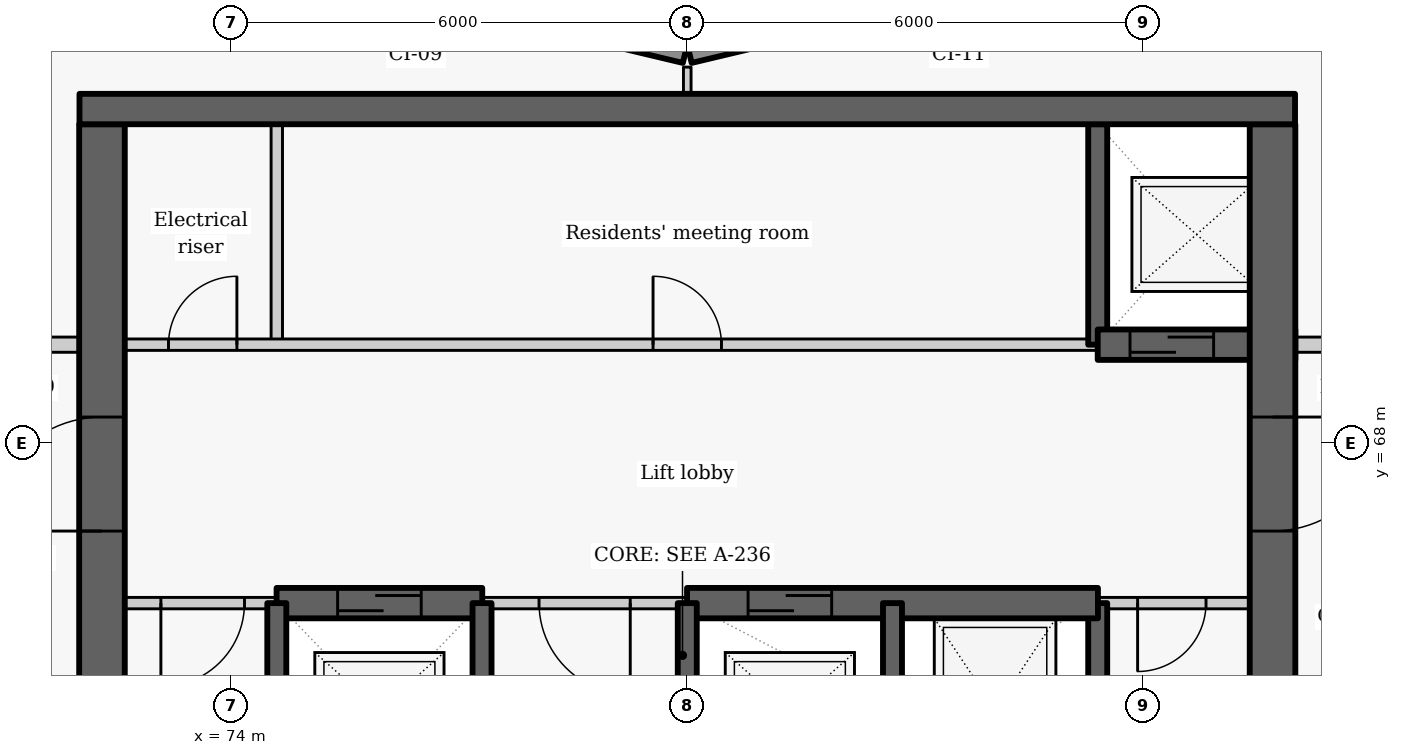
"""IFC4 building model, lengths in metres.
Left out: names, types, materials, properties, quantities, classifications, styles, units other than length and angle.
Written with IfcOpenShell. Run it as: python <this file> out.ifc"""

import sys

from ifc_helpers import new_model, si_unit, direction, frame, frame_2d, origin, place, context, subcontext, project, spatial, rectangle, extrude, element, fill, save


model = new_model("IFC4")
c1 = context("Model", 3, precision=1e-05, world=origin(), true_north=direction((0.0, 1.0)))
c2 = subcontext(c1, "Body", "Model", "MODEL_VIEW")
j1 = project(units=[si_unit("LENGTHUNIT", "METRE"), si_unit("PLANEANGLEUNIT", "RADIAN")], contexts=[c1])
p1 = place(None, origin())
s1 = spatial("IfcSite", under=j1, at=p1, CompositionType="ELEMENT")
p2 = place(p1, origin())
s2 = spatial("IfcBuilding", under=s1, at=p2, CompositionType="ELEMENT")
p3 = place(p2, frame((0.0, 0.0, 213.0)))
s3 = spatial("IfcBuildingStorey", under=s2, at=p3, CompositionType="ELEMENT", Elevation=213.0)
p4 = place(p3, frame((83.186, 73.881, 0.0), z_axis=(0.0, 0.0, 1.0), x_axis=(-0.972773113459, -0.231759508395, 0.0)))
e1 = element("IfcWall", 1, at=p4, inside=s3, PredefinedType="SOLIDWALL", context=c2, shape_type="SweptSolid", body=[
    extrude(rectangle(XDim=3.246, YDim=0.25, at=frame_2d((1.623, 0.0))), origin(), (0.0, 0.0, 1.0), 2.425),
])
p5 = place(p4, frame((0.573, 0.0, 0.9)))
e2 = element("IfcOpeningElement", 2, at=p5, cuts=e1, PredefinedType="OPENING", context=c2, shape_type="SweptSolid", body=[
    extrude(rectangle(XDim=2.1, YDim=1.1, at=frame_2d((1.05, 0.55))), frame((0.0, 0.135, 0.0), z_axis=(0.0, -1.0, 0.0), x_axis=(1.0, 0.0, 0.0)), (0.0, 0.0, 1.0), 0.27),
])
p6 = place(p3, frame((79.971, 73.128, 0.0), z_axis=(0.0, 0.0, 1.0), x_axis=(-0.972773113459, 0.231759508395, 0.0)))
e3 = element("IfcWall", 3, at=p6, inside=s3, PredefinedType="SOLIDWALL", context=c2, shape_type="SweptSolid", body=[
    extrude(rectangle(XDim=3.246, YDim=0.25, at=frame_2d((1.623, 0.0))), origin(), (0.0, 0.0, 1.0), 2.425),
])
p7 = place(p6, frame((0.573, 0.0, 0.9)))
e4 = element("IfcOpeningElement", 4, at=p7, cuts=e3, PredefinedType="OPENING", context=c2, shape_type="SweptSolid", body=[
    extrude(rectangle(XDim=2.1, YDim=1.1, at=frame_2d((1.05, 0.55))), frame((0.0, 0.135, 0.0), z_axis=(0.0, -1.0, 0.0), x_axis=(1.0, 0.0, 0.0)), (0.0, 0.0, 1.0), 0.27),
])
p8 = place(p3, frame((74.6, 69.3, 0.0), z_axis=(0.0, 0.0, 1.0), x_axis=(0.0, 1.0, 0.0)))
e5 = element("IfcWall", 5, at=p8, inside=s3, PredefinedType="PARTITIONING", context=c2, shape_type="SweptSolid", body=[
    extrude(rectangle(XDim=2.9, YDim=0.15, at=frame_2d((1.45, 0.0))), origin(), (0.0, 0.0, 1.0), 3.025),
])
p9 = place(p3, frame((72.0, 69.3, 0.0), z_axis=(0.0, 0.0, 1.0), x_axis=(1.0, 0.0, 0.0)))
e6 = element("IfcWall", 6, at=p9, inside=s3, PredefinedType="PARTITIONING", context=c2, shape_type="SweptSolid", body=[
    extrude(rectangle(XDim=13.4, YDim=0.15, at=frame_2d((6.7, 0.0))), origin(), (0.0, 0.0, 1.0), 3.025),
])
p10 = place(p9, frame((1.175, 0.0, 0.0)))
e7 = element("IfcOpeningElement", 7, at=p10, cuts=e6, PredefinedType="OPENING", context=c2, shape_type="SweptSolid", body=[
    extrude(rectangle(XDim=0.9, YDim=2.1, at=frame_2d((0.45, 1.05))), frame((0.0, 0.085, 0.0), z_axis=(0.0, -1.0, 0.0), x_axis=(1.0, 0.0, 0.0)), (0.0, 0.0, 1.0), 0.17),
])
p11 = place(p9, frame((7.55, 0.0, 0.0)))
e8 = element("IfcOpeningElement", 8, at=p11, cuts=e6, PredefinedType="OPENING", context=c2, shape_type="SweptSolid", body=[
    extrude(rectangle(XDim=0.9, YDim=2.1, at=frame_2d((0.45, 1.05))), frame((0.0, 0.085, 0.0), z_axis=(0.0, -1.0, 0.0), x_axis=(1.0, 0.0, 0.0)), (0.0, 0.0, 1.0), 0.17),
])
p12 = place(p3, frame((72.3, 63.1, -0.275), z_axis=(0.0, 0.0, 1.0), x_axis=(0.0, 1.0, 0.0)))
e9 = element("IfcWall", 9, at=p12, inside=s3, PredefinedType="SHEAR", context=c2, shape_type="SweptSolid", body=[
    extrude(rectangle(XDim=9.1, YDim=0.6, at=frame_2d((4.55, 0.0))), origin(), (0.0, 0.0, 1.0), 3.3),
])
p13 = place(p12, frame((3.748, 0.0, 0.275)))
e10 = element("IfcOpeningElement", 10, at=p13, cuts=e9, PredefinedType="OPENING", context=c2, shape_type="SweptSolid", body=[
    extrude(rectangle(XDim=1.5, YDim=2.1, at=frame_2d((0.75, 1.05))), frame((0.0, 0.31, 0.0), z_axis=(0.0, -1.0, 0.0), x_axis=(1.0, 0.0, 0.0)), (0.0, 0.0, 1.0), 0.62),
])
p14 = place(p3, frame((85.4, 63.1, -0.275), z_axis=(0.0, 0.0, 1.0), x_axis=(0.0, 1.0, 0.0)))
e11 = element("IfcWall", 11, at=p14, inside=s3, PredefinedType="SHEAR", context=c2, shape_type="SweptSolid", body=[
    extrude(rectangle(XDim=2.8, YDim=0.25, at=frame_2d((1.4, 0.0))), origin(), (0.0, 0.0, 1.0), 3.3),
])
p15 = place(p3, frame((85.4, 69.3, -0.275), z_axis=(0.0, 0.0, 1.0), x_axis=(0.0, 1.0, 0.0)))
e12 = element("IfcWall", 12, at=p15, inside=s3, PredefinedType="SHEAR", context=c2, shape_type="SweptSolid", body=[
    extrude(rectangle(XDim=2.9, YDim=0.25, at=frame_2d((1.45, 0.0))), origin(), (0.0, 0.0, 1.0), 3.3),
])
p16 = place(p3, frame((85.4, 69.3, -0.275), z_axis=(0.0, 0.0, 1.0), x_axis=(1.0, 0.0, 0.0)))
e13 = element("IfcWall", 13, at=p16, inside=s3, PredefinedType="SHEAR", context=c2, shape_type="SweptSolid", body=[
    extrude(rectangle(XDim=2.6, YDim=0.4, at=frame_2d((1.3, 0.0))), origin(), (0.0, 0.0, 1.0), 3.3),
])
p17 = place(p16, frame((0.425, 0.0, 0.275)))
e14 = element("IfcOpeningElement", 14, at=p17, cuts=e13, PredefinedType="OPENING", context=c2, shape_type="SweptSolid", body=[
    extrude(rectangle(XDim=1.1, YDim=2.1, at=frame_2d((0.55, 1.05))), frame((0.0, 0.21, 0.0), z_axis=(0.0, -1.0, 0.0), x_axis=(1.0, 0.0, 0.0)), (0.0, 0.0, 1.0), 0.42),
])
p18 = place(p3, frame((87.7, 72.2, -0.275), z_axis=(0.0, 0.0, 1.0), x_axis=(0.0, -1.0, 0.0)))
e15 = element("IfcWall", 15, at=p18, inside=s3, PredefinedType="SHEAR", context=c2, shape_type="SweptSolid", body=[
    extrude(rectangle(XDim=14.25, YDim=0.6, at=frame_2d((7.125, 0.0))), origin(), (0.0, 0.0, 1.0), 3.3),
])
p19 = place(p18, frame((3.852, 0.0, 0.275)))
e16 = element("IfcOpeningElement", 16, at=p19, cuts=e15, PredefinedType="OPENING", context=c2, shape_type="SweptSolid", body=[
    extrude(rectangle(XDim=1.5, YDim=2.1, at=frame_2d((0.75, 1.05))), frame((0.0, 0.31, 0.0), z_axis=(0.0, -1.0, 0.0), x_axis=(1.0, 0.0, 0.0)), (0.0, 0.0, 1.0), 0.62),
])
p20 = place(p3, frame((74.603, 65.9, 0.0), z_axis=(0.0, 0.0, 1.0), x_axis=(-1.0, 0.0, 0.0)))
e17 = element("IfcWall", 17, at=p20, inside=s3, PredefinedType="PARTITIONING", context=c2, shape_type="SweptSolid", body=[
    extrude(rectangle(XDim=2.603, YDim=0.15, at=frame_2d((1.302, 0.0))), origin(), (0.0, 0.0, 1.0), 3.025),
])
p21 = place(p20, frame((0.428, 0.0, 0.0)))
e18 = element("IfcOpeningElement", 18, at=p21, cuts=e17, PredefinedType="OPENING", context=c2, shape_type="SweptSolid", body=[
    extrude(rectangle(XDim=1.1, YDim=2.1, at=frame_2d((0.55, 1.05))), frame((0.0, 0.085, 0.0), z_axis=(0.0, -1.0, 0.0), x_axis=(1.0, 0.0, 0.0)), (0.0, 0.0, 1.0), 0.17),
])
p22 = place(p3, frame((80.003, 65.9, 0.0), z_axis=(0.0, 0.0, 1.0), x_axis=(-1.0, 0.0, 0.0)))
e19 = element("IfcWall", 19, at=p22, inside=s3, PredefinedType="PARTITIONING", context=c2, shape_type="SweptSolid", body=[
    extrude(rectangle(XDim=2.706, YDim=0.15, at=frame_2d((1.353, 0.0))), origin(), (0.0, 0.0, 1.0), 3.025),
])
p23 = place(p22, frame((0.753, 0.0, 0.0)))
e20 = element("IfcOpeningElement", 20, at=p23, cuts=e19, PredefinedType="OPENING", context=c2, shape_type="SweptSolid", body=[
    extrude(rectangle(XDim=1.2, YDim=2.1, at=frame_2d((0.6, 1.05))), frame((0.0, 0.085, 0.0), z_axis=(0.0, -1.0, 0.0), x_axis=(1.0, 0.0, 0.0)), (0.0, 0.0, 1.0), 0.17),
])
p24 = place(p3, frame((88.0, 65.9, 0.0), z_axis=(0.0, 0.0, 1.0), x_axis=(-1.0, 0.0, 0.0)))
e21 = element("IfcWall", 21, at=p24, inside=s3, PredefinedType="PARTITIONING", context=c2, shape_type="SweptSolid", body=[
    extrude(rectangle(XDim=2.603, YDim=0.15, at=frame_2d((1.302, 0.0))), origin(), (0.0, 0.0, 1.0), 3.025),
])
p25 = place(p24, frame((1.175, 0.0, 0.0)))
e22 = element("IfcOpeningElement", 22, at=p25, cuts=e21, PredefinedType="OPENING", context=c2, shape_type="SweptSolid", body=[
    extrude(rectangle(XDim=0.9, YDim=2.1, at=frame_2d((0.45, 1.05))), frame((0.0, 0.085, 0.0), z_axis=(0.0, -1.0, 0.0), x_axis=(1.0, 0.0, 0.0)), (0.0, 0.0, 1.0), 0.17),
])
p26 = place(p3, frame((74.597, 65.9, -0.275), z_axis=(0.0, 0.0, 1.0), x_axis=(1.0, 0.0, 0.0)))
e23 = element("IfcWall", 23, at=p26, inside=s3, PredefinedType="SHEAR", context=c2, shape_type="SweptSolid", body=[
    extrude(rectangle(XDim=2.706, YDim=0.4, at=frame_2d((1.353, 0.0))), origin(), (0.0, 0.0, 1.0), 3.3),
])
p27 = place(p26, frame((0.803, 0.0, 0.275)))
e24 = element("IfcOpeningElement", 24, at=p27, cuts=e23, PredefinedType="OPENING", context=c2, shape_type="SweptSolid", body=[
    extrude(rectangle(XDim=1.1, YDim=2.1, at=frame_2d((0.55, 1.05))), frame((0.0, 0.21, 0.0), z_axis=(0.0, -1.0, 0.0), x_axis=(1.0, 0.0, 0.0)), (0.0, 0.0, 1.0), 0.42),
])
p28 = place(p3, frame((79.997, 65.9, -0.275), z_axis=(0.0, 0.0, 1.0), x_axis=(1.0, 0.0, 0.0)))
e25 = element("IfcWall", 25, at=p28, inside=s3, PredefinedType="SHEAR", context=c2, shape_type="SweptSolid", body=[
    extrude(rectangle(XDim=5.406, YDim=0.4, at=frame_2d((2.703, 0.0))), origin(), (0.0, 0.0, 1.0), 3.3),
])
p29 = place(p28, frame((0.803, 0.0, 0.275)))
e26 = element("IfcOpeningElement", 26, at=p29, cuts=e25, PredefinedType="OPENING", context=c2, shape_type="SweptSolid", body=[
    extrude(rectangle(XDim=1.1, YDim=2.1, at=frame_2d((0.55, 1.05))), frame((0.0, 0.21, 0.0), z_axis=(0.0, -1.0, 0.0), x_axis=(1.0, 0.0, 0.0)), (0.0, 0.0, 1.0), 0.42),
])
for number, where, z_axis, x_axis in (
    (27, (74.6, 63.1, -0.275), (0.0, 0.0, 1.0), (0.0, 1.0, 0.0)),
    (28, (77.3, 63.1, -0.275), (0.0, 0.0, 1.0), (0.0, 1.0, 0.0)),
    (29, (80.0, 63.1, -0.275), (0.0, 0.0, 1.0), (0.0, 1.0, 0.0)),
    (30, (82.7, 63.1, -0.275), (0.0, 0.0, 1.0), (0.0, 1.0, 0.0)),
):
    element("IfcWall", number, at=place(p3, frame(where, z_axis=z_axis, x_axis=x_axis)), inside=s3, PredefinedType="SHEAR", context=c2, shape_type="SweptSolid", body=[
        extrude(rectangle(XDim=2.8, YDim=0.25, at=frame_2d((1.4, 0.0))), origin(), (0.0, 0.0, 1.0), 3.3),
    ])
for number, where, z_axis, x_axis in (
    (31, (70.45, 69.3, 0.0), (0.0, 0.0, 1.0), (1.0, 0.0, 0.0)),
    (32, (88.0, 69.3, 0.0), (0.0, 0.0, 1.0), (1.0, 0.0, 0.0)),
):
    element("IfcWall", number, at=place(p3, frame(where, z_axis=z_axis, x_axis=x_axis)), inside=s3, PredefinedType="PARTITIONING", context=c2, shape_type="SweptSolid", body=[
        extrude(rectangle(XDim=1.55, YDim=0.2, at=frame_2d((0.775, 0.0))), origin(), (0.0, 0.0, 1.0), 3.025),
    ])
p30 = place(p3, frame((80.0, 72.6, 0.0), z_axis=(0.0, 0.0, 1.0), x_axis=(0.0, 1.0, 0.0)))
e33 = element("IfcWall", 33, at=p30, inside=s3, PredefinedType="PARTITIONING", context=c2, shape_type="SweptSolid", body=[
    extrude(rectangle(XDim=0.352, YDim=0.1, at=frame_2d((0.176, 0.0))), origin(), (0.0, 0.0, 1.0), 3.025),
])
p31 = place(p3, frame((72.004, 72.4, -0.275), z_axis=(0.0, 0.0, 1.0), x_axis=(1.0, 0.0, 0.0)))
e34 = element("IfcWall", 34, at=p31, inside=s3, PredefinedType="SHEAR", context=c2, shape_type="SweptSolid", body=[
    extrude(rectangle(XDim=15.992, YDim=0.4, at=frame_2d((7.996, 0.0))), origin(), (0.0, 0.0, 1.0), 3.3),
])
p32 = place(p10, origin())
e35 = element("IfcDoor", 35, at=p32, inside=s3, OperationType="SINGLE_SWING_RIGHT", PredefinedType="DOOR", context=c2, shape_type="SweptSolid", body=[
    extrude(rectangle(XDim=0.9, YDim=2.1, at=frame_2d((0.45, 1.05))), frame((0.0, 0.025, 0.0), z_axis=(0.0, -1.0, 0.0), x_axis=(1.0, 0.0, 0.0)), (0.0, 0.0, 1.0), 0.05),
])
fill(e7, e35)
p33 = place(p17, origin())
e36 = element("IfcDoor", 36, at=p33, inside=s3, OperationType="SLIDING_TO_LEFT", PredefinedType="DOOR", context=c2, shape_type="SweptSolid", body=[
    extrude(rectangle(XDim=1.1, YDim=2.1, at=frame_2d((0.55, 1.05))), frame((0.0, 0.025, 0.0), z_axis=(0.0, -1.0, 0.0), x_axis=(1.0, 0.0, 0.0)), (0.0, 0.0, 1.0), 0.05),
])
fill(e14, e36)
p34 = place(p11, origin())
e37 = element("IfcDoor", 37, at=p34, inside=s3, OperationType="SINGLE_SWING_LEFT", PredefinedType="DOOR", context=c2, shape_type="SweptSolid", body=[
    extrude(rectangle(XDim=0.9, YDim=2.1, at=frame_2d((0.45, 1.05))), frame((0.0, 0.025, 0.0), z_axis=(0.0, -1.0, 0.0), x_axis=(1.0, 0.0, 0.0)), (0.0, 0.0, 1.0), 0.05),
])
fill(e8, e37)
p35 = place(p21, origin())
e38 = element("IfcDoor", 38, at=p35, inside=s3, OperationType="SINGLE_SWING_RIGHT", PredefinedType="DOOR", context=c2, shape_type="SweptSolid", body=[
    extrude(rectangle(XDim=1.1, YDim=2.1, at=frame_2d((0.55, 1.05))), frame((0.0, 0.025, 0.0), z_axis=(0.0, -1.0, 0.0), x_axis=(1.0, 0.0, 0.0)), (0.0, 0.0, 1.0), 0.05),
])
fill(e18, e38)
p36 = place(p27, origin())
e39 = element("IfcDoor", 39, at=p36, inside=s3, OperationType="SLIDING_TO_LEFT", PredefinedType="DOOR", context=c2, shape_type="SweptSolid", body=[
    extrude(rectangle(XDim=1.1, YDim=2.1, at=frame_2d((0.55, 1.05))), frame((0.0, 0.025, 0.0), z_axis=(0.0, -1.0, 0.0), x_axis=(1.0, 0.0, 0.0)), (0.0, 0.0, 1.0), 0.05),
])
fill(e24, e39)
p37 = place(p23, origin())
e40 = element("IfcDoor", 40, at=p37, inside=s3, OperationType="DOUBLE_DOOR_SINGLE_SWING", PredefinedType="DOOR", context=c2, shape_type="SweptSolid", body=[
    extrude(rectangle(XDim=1.2, YDim=2.1, at=frame_2d((0.6, 1.05))), frame((0.0, 0.025, 0.0), z_axis=(0.0, -1.0, 0.0), x_axis=(1.0, 0.0, 0.0)), (0.0, 0.0, 1.0), 0.05),
])
fill(e20, e40)
p38 = place(p29, origin())
e41 = element("IfcDoor", 41, at=p38, inside=s3, OperationType="SLIDING_TO_LEFT", PredefinedType="DOOR", context=c2, shape_type="SweptSolid", body=[
    extrude(rectangle(XDim=1.1, YDim=2.1, at=frame_2d((0.55, 1.05))), frame((0.0, 0.025, 0.0), z_axis=(0.0, -1.0, 0.0), x_axis=(1.0, 0.0, 0.0)), (0.0, 0.0, 1.0), 0.05),
])
fill(e26, e41)
p39 = place(p25, origin())
e42 = element("IfcDoor", 42, at=p39, inside=s3, OperationType="SINGLE_SWING_RIGHT", PredefinedType="DOOR", context=c2, shape_type="SweptSolid", body=[
    extrude(rectangle(XDim=0.9, YDim=2.1, at=frame_2d((0.45, 1.05))), frame((0.0, 0.025, 0.0), z_axis=(0.0, -1.0, 0.0), x_axis=(1.0, 0.0, 0.0)), (0.0, 0.0, 1.0), 0.05),
])
fill(e22, e42)
p40 = place(p19, origin())
e43 = element("IfcDoor", 43, at=p40, inside=s3, OperationType="DOUBLE_DOOR_SINGLE_SWING", PredefinedType="DOOR", context=c2, shape_type="SweptSolid", body=[
    extrude(rectangle(XDim=1.5, YDim=2.1, at=frame_2d((0.75, 1.05))), frame((0.0, 0.025, 0.0), z_axis=(0.0, -1.0, 0.0), x_axis=(1.0, 0.0, 0.0)), (0.0, 0.0, 1.0), 0.05),
])
fill(e16, e43)
p41 = place(p13, origin())
e44 = element("IfcDoor", 44, at=p41, inside=s3, OperationType="DOUBLE_DOOR_SINGLE_SWING", PredefinedType="DOOR", context=c2, shape_type="SweptSolid", body=[
    extrude(rectangle(XDim=1.5, YDim=2.1, at=frame_2d((0.75, 1.05))), frame((0.0, 0.025, 0.0), z_axis=(0.0, -1.0, 0.0), x_axis=(1.0, 0.0, 0.0)), (0.0, 0.0, 1.0), 0.05),
])
fill(e10, e44)
save(model, sys.argv[1])
